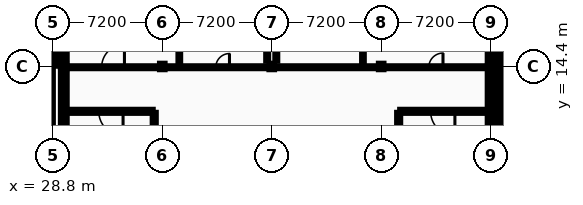
"""IFC4 building model, lengths in metres.
Left out: names, types, materials, properties, quantities, classifications, styles, units other than length and angle.
Written with IfcOpenShell. Run it as: python <this file> out.ifc"""

import sys

from ifc_helpers import new_model, si_unit, direction, frame, frame_2d, origin, origin_2d, place, context, subcontext, project, spatial, rectangle, i_section, extrude, element, fill, save


model = new_model("IFC4")
c1 = context("Model", 3, precision=1e-05, world=origin(), true_north=direction((0.0, 1.0)))
c2 = subcontext(c1, "Body", "Model", "MODEL_VIEW")
j1 = project(units=[si_unit("LENGTHUNIT", "METRE"), si_unit("PLANEANGLEUNIT", "RADIAN")], contexts=[c1])
p1 = place(None, origin())
s1 = spatial("IfcSite", under=j1, at=p1, CompositionType="ELEMENT")
p2 = place(p1, origin())
s2 = spatial("IfcBuilding", under=s1, at=p2, CompositionType="ELEMENT")
p3 = place(p2, frame((0.0, 0.0, 9.6)))
s3 = spatial("IfcBuildingStorey", under=s2, at=p3, CompositionType="ELEMENT", Elevation=9.6)
for number, where, z_axis, x_axis in (
    (1, (29.52, 14.4, 0.0), (0.0, 0.0, 1.0), (1.0, 0.0, 0.0)),
    (2, (36.0, 14.4, 0.0), (0.0, 0.0, 1.0), (1.0, 0.0, 0.0)),
    (3, (43.2, 14.4, 0.0), (0.0, 0.0, 1.0), (1.0, 0.0, 0.0)),
    (4, (50.4, 14.4, 0.0), (0.0, 0.0, 1.0), (1.0, 0.0, 0.0)),
    (5, (57.6, 14.4, 0.0), (0.0, 0.0, 1.0), (1.0, 0.0, 0.0)),
    (6, (58.32, 14.4, 0.0), (0.0, 0.0, 1.0), (1.0, 0.0, 0.0)),
):
    element("IfcColumn", number, at=place(p3, frame(where, z_axis=z_axis, x_axis=x_axis)), inside=s3, PredefinedType="COLUMN", context=c2, shape_type="SweptSolid", body=[
        extrude(i_section(OverallWidth=0.3, OverallDepth=0.36, WebThickness=0.012, FlangeThickness=0.022, FilletRadius=0.027, at=origin_2d()), origin(), (0.0, 0.0, 1.0), 4.4),
    ])
p4 = place(p3, frame((28.8, 14.45, 0.0), z_axis=(0.0, 0.0, 1.0), x_axis=(0.0, 1.0, 0.0)))
e7 = element("IfcWall", 7, at=p4, inside=s3, PredefinedType="STANDARD", context=c2, shape_type="SweptSolid", body=[
    extrude(rectangle(XDim=7.15, YDim=0.38, at=frame_2d((3.575, 0.0))), origin(), (0.0, 0.0, 1.0), 4.2),
])
p5 = place(p4, frame((1.613, 0.0, 0.95)))
e8 = element("IfcOpeningElement", 8, at=p5, cuts=e7, PredefinedType="OPENING", context=c2, shape_type="SweptSolid", body=[
    extrude(rectangle(XDim=1.064, YDim=1.332, at=frame_2d((0.532, 0.666))), frame((0.0, 0.2, 0.0), z_axis=(0.0, -1.0, 0.0), x_axis=(1.0, 0.0, 0.0)), (0.0, 0.0, 1.0), 0.4),
])
p6 = place(p4, frame((4.473, 0.0, 0.95)))
e9 = element("IfcOpeningElement", 9, at=p6, cuts=e7, PredefinedType="OPENING", context=c2, shape_type="SweptSolid", body=[
    extrude(rectangle(XDim=1.064, YDim=1.332, at=frame_2d((0.532, 0.666))), frame((0.0, 0.2, 0.0), z_axis=(0.0, -1.0, 0.0), x_axis=(1.0, 0.0, 0.0)), (0.0, 0.0, 1.0), 0.4),
])
p7 = place(p3, frame((29.52, 14.4, 0.0), z_axis=(0.0, 0.0, 1.0), x_axis=(0.0, -1.0, 0.0)))
e10 = element("IfcWall", 10, at=p7, inside=s3, PredefinedType="STANDARD", context=c2, shape_type="SweptSolid", body=[
    extrude(rectangle(XDim=5.5, YDim=0.38, at=frame_2d((2.75, 0.0))), origin(), (0.0, 0.0, 1.0), 4.2),
])
p8 = place(p3, frame((29.52, 21.6, 0.0), z_axis=(0.0, 0.0, 1.0), x_axis=(0.0, -1.0, 0.0)))
e11 = element("IfcWall", 11, at=p8, inside=s3, PredefinedType="STANDARD", context=c2, shape_type="SweptSolid", body=[
    extrude(rectangle(XDim=7.2, YDim=0.38, at=frame_2d((3.6, 0.0))), origin(), (0.0, 0.0, 1.0), 3.895),
])
p9 = place(p8, frame((1.662, 0.0, 0.95)))
e12 = element("IfcOpeningElement", 12, at=p9, cuts=e11, PredefinedType="OPENING", context=c2, shape_type="SweptSolid", body=[
    extrude(rectangle(XDim=0.996, YDim=1.368, at=frame_2d((0.498, 0.684))), frame((0.0, 0.2, 0.0), z_axis=(0.0, -1.0, 0.0), x_axis=(1.0, 0.0, 0.0)), (0.0, 0.0, 1.0), 0.4),
])
p10 = place(p8, frame((4.542, 0.0, 0.95)))
e13 = element("IfcOpeningElement", 13, at=p10, cuts=e11, PredefinedType="OPENING", context=c2, shape_type="SweptSolid", body=[
    extrude(rectangle(XDim=0.996, YDim=1.368, at=frame_2d((0.498, 0.684))), frame((0.0, 0.2, 0.0), z_axis=(0.0, -1.0, 0.0), x_axis=(1.0, 0.0, 0.0)), (0.0, 0.0, 1.0), 0.4),
])
p11 = place(p3, frame((57.6, 8.9, 0.0), z_axis=(0.0, 0.0, 1.0), x_axis=(0.0, 1.0, 0.0)))
e14 = element("IfcWall", 14, at=p11, inside=s3, PredefinedType="STANDARD", context=c2, shape_type="SweptSolid", body=[
    extrude(rectangle(XDim=5.5, YDim=0.38, at=frame_2d((2.75, 0.0))), origin(), (0.0, 0.0, 1.0), 4.2),
])
p12 = place(p3, frame((57.6, 14.4, 0.0), z_axis=(0.0, 0.0, 1.0), x_axis=(0.0, 1.0, 0.0)))
e15 = element("IfcWall", 15, at=p12, inside=s3, PredefinedType="STANDARD", context=c2, shape_type="SweptSolid", body=[
    extrude(rectangle(XDim=7.2, YDim=0.38, at=frame_2d((3.6, 0.0))), origin(), (0.0, 0.0, 1.0), 3.895),
])
p13 = place(p12, frame((1.594, 0.0, 0.95)))
e16 = element("IfcOpeningElement", 16, at=p13, cuts=e15, PredefinedType="OPENING", context=c2, shape_type="SweptSolid", body=[
    extrude(rectangle(XDim=1.132, YDim=1.368, at=frame_2d((0.566, 0.684))), frame((0.0, 0.2, 0.0), z_axis=(0.0, -1.0, 0.0), x_axis=(1.0, 0.0, 0.0)), (0.0, 0.0, 1.0), 0.4),
])
p14 = place(p12, frame((4.474, 0.0, 0.95)))
e17 = element("IfcOpeningElement", 17, at=p14, cuts=e15, PredefinedType="OPENING", context=c2, shape_type="SweptSolid", body=[
    extrude(rectangle(XDim=1.132, YDim=1.368, at=frame_2d((0.566, 0.684))), frame((0.0, 0.2, 0.0), z_axis=(0.0, -1.0, 0.0), x_axis=(1.0, 0.0, 0.0)), (0.0, 0.0, 1.0), 0.4),
])
p15 = place(p3, frame((58.32, 14.4, 0.0), z_axis=(0.0, 0.0, 1.0), x_axis=(0.0, -1.0, 0.0)))
e18 = element("IfcWall", 18, at=p15, inside=s3, PredefinedType="STANDARD", context=c2, shape_type="SweptSolid", body=[
    extrude(rectangle(XDim=5.5, YDim=0.38, at=frame_2d((2.75, 0.0))), origin(), (0.0, 0.0, 1.0), 4.2),
])
p16 = place(p3, frame((58.32, 21.6, 0.0), z_axis=(0.0, 0.0, 1.0), x_axis=(0.0, -1.0, 0.0)))
e19 = element("IfcWall", 19, at=p16, inside=s3, PredefinedType="STANDARD", context=c2, shape_type="SweptSolid", body=[
    extrude(rectangle(XDim=7.2, YDim=0.38, at=frame_2d((3.6, 0.0))), origin(), (0.0, 0.0, 1.0), 3.895),
])
p17 = place(p16, frame((1.713, 0.0, 0.95)))
e20 = element("IfcOpeningElement", 20, at=p17, cuts=e19, PredefinedType="OPENING", context=c2, shape_type="SweptSolid", body=[
    extrude(rectangle(XDim=0.894, YDim=1.332, at=frame_2d((0.447, 0.666))), frame((0.0, 0.2, 0.0), z_axis=(0.0, -1.0, 0.0), x_axis=(1.0, 0.0, 0.0)), (0.0, 0.0, 1.0), 0.4),
])
p18 = place(p16, frame((4.593, 0.0, 0.95)))
e21 = element("IfcOpeningElement", 21, at=p18, cuts=e19, PredefinedType="OPENING", context=c2, shape_type="SweptSolid", body=[
    extrude(rectangle(XDim=0.894, YDim=1.332, at=frame_2d((0.447, 0.666))), frame((0.0, 0.2, 0.0), z_axis=(0.0, -1.0, 0.0), x_axis=(1.0, 0.0, 0.0)), (0.0, 0.0, 1.0), 0.4),
])
p19 = place(p3, frame((28.6, 5.85, 0.0), z_axis=(0.0, 0.0, 1.0), x_axis=(0.0, 1.0, 0.0)))
e22 = element("IfcWall", 22, at=p19, inside=s3, PredefinedType="SHEAR", context=c2, shape_type="SweptSolid", body=[
    extrude(rectangle(XDim=8.6, YDim=0.4, at=frame_2d((4.3, 0.0))), origin(), (0.0, 0.0, 1.0), 4.2),
])
p20 = place(p3, frame((29.87, 11.45, 0.0), z_axis=(0.0, 0.0, 1.0), x_axis=(1.0, 0.0, 0.0)))
e23 = element("IfcWall", 23, at=p20, inside=s3, PredefinedType="PARTITIONING", context=c2, shape_type="SweptSolid", body=[
    extrude(rectangle(XDim=5.5, YDim=0.2, at=frame_2d((2.75, 0.0))), origin(), (0.0, 0.0, 1.0), 4.2),
])
p21 = place(p20, frame((1.95, 0.0, 0.0)))
e24 = element("IfcOpeningElement", 24, at=p21, cuts=e23, PredefinedType="OPENING", context=c2, shape_type="SweptSolid", body=[
    extrude(rectangle(XDim=1.6, YDim=2.2, at=frame_2d((0.8, 1.1))), frame((0.0, 0.11, 0.0), z_axis=(0.0, -1.0, 0.0), x_axis=(1.0, 0.0, 0.0)), (0.0, 0.0, 1.0), 0.22),
])
p22 = place(p3, frame((35.47, 8.9, 0.0), z_axis=(0.0, 0.0, 1.0), x_axis=(0.0, 1.0, 0.0)))
e25 = element("IfcWall", 25, at=p22, inside=s3, PredefinedType="PARTITIONING", context=c2, shape_type="SweptSolid", body=[
    extrude(rectangle(XDim=2.45, YDim=0.2, at=frame_2d((1.225, 0.0))), origin(), (0.0, 0.0, 1.0), 4.2),
])
p23 = place(p3, frame((51.65, 11.45, 0.0), z_axis=(0.0, 0.0, 1.0), x_axis=(1.0, 0.0, 0.0)))
e26 = element("IfcWall", 26, at=p23, inside=s3, PredefinedType="PARTITIONING", context=c2, shape_type="SweptSolid", body=[
    extrude(rectangle(XDim=5.6, YDim=0.2, at=frame_2d((2.8, 0.0))), origin(), (0.0, 0.0, 1.0), 4.2),
])
p24 = place(p23, frame((2.0, 0.0, 0.0)))
e27 = element("IfcOpeningElement", 27, at=p24, cuts=e26, PredefinedType="OPENING", context=c2, shape_type="SweptSolid", body=[
    extrude(rectangle(XDim=1.6, YDim=2.2, at=frame_2d((0.8, 1.1))), frame((0.0, 0.11, 0.0), z_axis=(0.0, -1.0, 0.0), x_axis=(1.0, 0.0, 0.0)), (0.0, 0.0, 1.0), 0.22),
])
p25 = place(p3, frame((51.55, 8.9, 0.0), z_axis=(0.0, 0.0, 1.0), x_axis=(0.0, 1.0, 0.0)))
e28 = element("IfcWall", 28, at=p25, inside=s3, PredefinedType="PARTITIONING", context=c2, shape_type="SweptSolid", body=[
    extrude(rectangle(XDim=2.45, YDim=0.2, at=frame_2d((1.225, 0.0))), origin(), (0.0, 0.0, 1.0), 4.2),
])
p26 = place(p3, frame((29.9, 14.35, 0.0), z_axis=(0.0, 0.0, 1.0), x_axis=(1.0, 0.0, 0.0)))
e29 = element("IfcWall", 29, at=p26, inside=s3, PredefinedType="PARTITIONING", context=c2, shape_type="SweptSolid", body=[
    extrude(rectangle(XDim=5.72, YDim=0.125, at=frame_2d((2.86, 0.0))), origin(), (0.0, 0.0, 1.0), 3.895),
])
p27 = place(p26, frame((2.11, 0.0, 0.0)))
e30 = element("IfcOpeningElement", 30, at=p27, cuts=e29, PredefinedType="OPENING", context=c2, shape_type="SweptSolid", body=[
    extrude(rectangle(XDim=1.5, YDim=2.2, at=frame_2d((0.75, 1.1))), frame((0.0, 0.073, 0.0), z_axis=(0.0, -1.0, 0.0), x_axis=(1.0, 0.0, 0.0)), (0.0, 0.0, 1.0), 0.145),
])
p28 = place(p3, frame((36.38, 14.35, 0.0), z_axis=(0.0, 0.0, 1.0), x_axis=(1.0, 0.0, 0.0)))
e31 = element("IfcWall", 31, at=p28, inside=s3, PredefinedType="PARTITIONING", context=c2, shape_type="SweptSolid", body=[
    extrude(rectangle(XDim=6.44, YDim=0.125, at=frame_2d((3.22, 0.0))), origin(), (0.0, 0.0, 1.0), 3.895),
])
p29 = place(p28, frame((3.14, 0.0, 0.0)))
e32 = element("IfcOpeningElement", 32, at=p29, cuts=e31, PredefinedType="OPENING", context=c2, shape_type="SweptSolid", body=[
    extrude(rectangle(XDim=0.9, YDim=2.1, at=frame_2d((0.45, 1.05))), frame((0.0, 0.073, 0.0), z_axis=(0.0, -1.0, 0.0), x_axis=(1.0, 0.0, 0.0)), (0.0, 0.0, 1.0), 0.145),
])
p30 = place(p3, frame((43.58, 14.35, 0.0), z_axis=(0.0, 0.0, 1.0), x_axis=(1.0, 0.0, 0.0)))
e33 = element("IfcWall", 33, at=p30, inside=s3, PredefinedType="PARTITIONING", context=c2, shape_type="SweptSolid", body=[
    extrude(rectangle(XDim=6.44, YDim=0.125, at=frame_2d((3.22, 0.0))), origin(), (0.0, 0.0, 1.0), 3.895),
])
p31 = place(p30, frame((2.31, 0.0, 0.0)))
e34 = element("IfcOpeningElement", 34, at=p31, cuts=e33, PredefinedType="OPENING", context=c2, shape_type="SweptSolid", body=[
    extrude(rectangle(XDim=1.0, YDim=2.1, at=frame_2d((0.5, 1.05))), frame((0.0, 0.073, 0.0), z_axis=(0.0, -1.0, 0.0), x_axis=(1.0, 0.0, 0.0)), (0.0, 0.0, 1.0), 0.145),
])
p32 = place(p3, frame((50.78, 14.35, 0.0), z_axis=(0.0, 0.0, 1.0), x_axis=(1.0, 0.0, 0.0)))
e35 = element("IfcWall", 35, at=p32, inside=s3, PredefinedType="PARTITIONING", context=c2, shape_type="SweptSolid", body=[
    extrude(rectangle(XDim=6.44, YDim=0.125, at=frame_2d((3.22, 0.0))), origin(), (0.0, 0.0, 1.0), 3.895),
])
p33 = place(p32, frame((2.754, 0.0, 0.0)))
e36 = element("IfcOpeningElement", 36, at=p33, cuts=e35, PredefinedType="OPENING", context=c2, shape_type="SweptSolid", body=[
    extrude(rectangle(XDim=0.932, YDim=2.152, at=frame_2d((0.466, 1.076))), frame((0.0, 0.073, 0.0), z_axis=(0.0, -1.0, 0.0), x_axis=(1.0, 0.0, 0.0)), (0.0, 0.0, 1.0), 0.145),
])
p34 = place(p3, frame((37.12, 14.413, 0.0), z_axis=(0.0, 0.0, 1.0), x_axis=(0.0, 1.0, 0.0)))
e37 = element("IfcWall", 37, at=p34, inside=s3, PredefinedType="PARTITIONING", context=c2, shape_type="SweptSolid", body=[
    extrude(rectangle(XDim=14.132, YDim=0.11, at=frame_2d((7.066, 0.0))), origin(), (0.0, 0.0, 1.0), 4.2),
])
for number, where, z_axis, x_axis in (
    (38, (42.9, 14.78, 0.0), (0.0, 0.0, 1.0), (0.0, 1.0, 0.0)),
    (39, (43.5, 14.78, 0.0), (0.0, 0.0, 1.0), (0.0, 1.0, 0.0)),
):
    element("IfcWall", number, at=place(p3, frame(where, z_axis=z_axis, x_axis=x_axis)), inside=s3, PredefinedType="PARTITIONING", context=c2, shape_type="SweptSolid", body=[
        extrude(rectangle(XDim=6.44, YDim=0.125, at=frame_2d((3.22, 0.0))), origin(), (0.0, 0.0, 1.0), 4.2),
    ])
p35 = place(p3, frame((49.2, 14.413, 0.0), z_axis=(0.0, 0.0, 1.0), x_axis=(0.0, 1.0, 0.0)))
e40 = element("IfcWall", 40, at=p35, inside=s3, PredefinedType="PARTITIONING", context=c2, shape_type="SweptSolid", body=[
    extrude(rectangle(XDim=14.125, YDim=0.11, at=frame_2d((7.062, 0.0))), origin(), (0.0, 0.0, 1.0), 4.2),
])
p36 = place(p21, origin())
e41 = element("IfcDoor", 41, at=p36, inside=s3, OperationType="DOUBLE_DOOR_SINGLE_SWING", PredefinedType="DOOR", context=c2, shape_type="SweptSolid", body=[
    extrude(rectangle(XDim=1.6, YDim=2.2, at=frame_2d((0.8, 1.1))), frame((0.0, 0.025, 0.0), z_axis=(0.0, -1.0, 0.0), x_axis=(1.0, 0.0, 0.0)), (0.0, 0.0, 1.0), 0.05),
])
fill(e24, e41)
p37 = place(p24, origin())
e42 = element("IfcDoor", 42, at=p37, inside=s3, OperationType="DOUBLE_DOOR_SINGLE_SWING", PredefinedType="DOOR", context=c2, shape_type="SweptSolid", body=[
    extrude(rectangle(XDim=1.6, YDim=2.2, at=frame_2d((0.8, 1.1))), frame((0.0, 0.025, 0.0), z_axis=(0.0, -1.0, 0.0), x_axis=(1.0, 0.0, 0.0)), (0.0, 0.0, 1.0), 0.05),
])
fill(e27, e42)
p38 = place(p31, frame((1.0, 0.0, 0.0), z_axis=(0.0, 0.0, 1.0), x_axis=(-1.0, 0.0, 0.0)))
e43 = element("IfcDoor", 43, at=p38, inside=s3, OperationType="SLIDING_TO_LEFT", PredefinedType="DOOR", context=c2, shape_type="SweptSolid", body=[
    extrude(rectangle(XDim=1.0, YDim=2.1, at=frame_2d((0.5, 1.05))), frame((0.0, 0.025, 0.0), z_axis=(0.0, -1.0, 0.0), x_axis=(1.0, 0.0, 0.0)), (0.0, 0.0, 1.0), 0.05),
])
fill(e34, e43)
p39 = place(p29, frame((0.9, 0.0, 0.0), z_axis=(0.0, 0.0, 1.0), x_axis=(-1.0, 0.0, 0.0)))
e44 = element("IfcDoor", 44, at=p39, inside=s3, OperationType="SINGLE_SWING_RIGHT", PredefinedType="DOOR", context=c2, shape_type="SweptSolid", body=[
    extrude(rectangle(XDim=0.9, YDim=2.1, at=frame_2d((0.45, 1.05))), frame((0.0, 0.025, 0.0), z_axis=(0.0, -1.0, 0.0), x_axis=(1.0, 0.0, 0.0)), (0.0, 0.0, 1.0), 0.05),
])
fill(e32, e44)
p40 = place(p27, frame((1.5, 0.0, 0.0), z_axis=(0.0, 0.0, 1.0), x_axis=(-1.0, 0.0, 0.0)))
e45 = element("IfcDoor", 45, at=p40, inside=s3, OperationType="DOUBLE_DOOR_SINGLE_SWING", PredefinedType="DOOR", context=c2, shape_type="SweptSolid", body=[
    extrude(rectangle(XDim=1.5, YDim=2.2, at=frame_2d((0.75, 1.1))), frame((0.0, 0.025, 0.0), z_axis=(0.0, -1.0, 0.0), x_axis=(1.0, 0.0, 0.0)), (0.0, 0.0, 1.0), 0.05),
])
fill(e30, e45)
p41 = place(p33, frame((0.932, 0.0, 0.0), z_axis=(0.0, 0.0, 1.0), x_axis=(-1.0, 0.0, 0.0)))
e46 = element("IfcDoor", 46, at=p41, inside=s3, OperationType="SINGLE_SWING_RIGHT", PredefinedType="DOOR", context=c2, shape_type="SweptSolid", body=[
    extrude(rectangle(XDim=0.932, YDim=2.152, at=frame_2d((0.466, 1.076))), frame((0.0, 0.025, 0.0), z_axis=(0.0, -1.0, 0.0), x_axis=(1.0, 0.0, 0.0)), (0.0, 0.0, 1.0), 0.05),
])
fill(e36, e46)
save(model, sys.argv[1])
